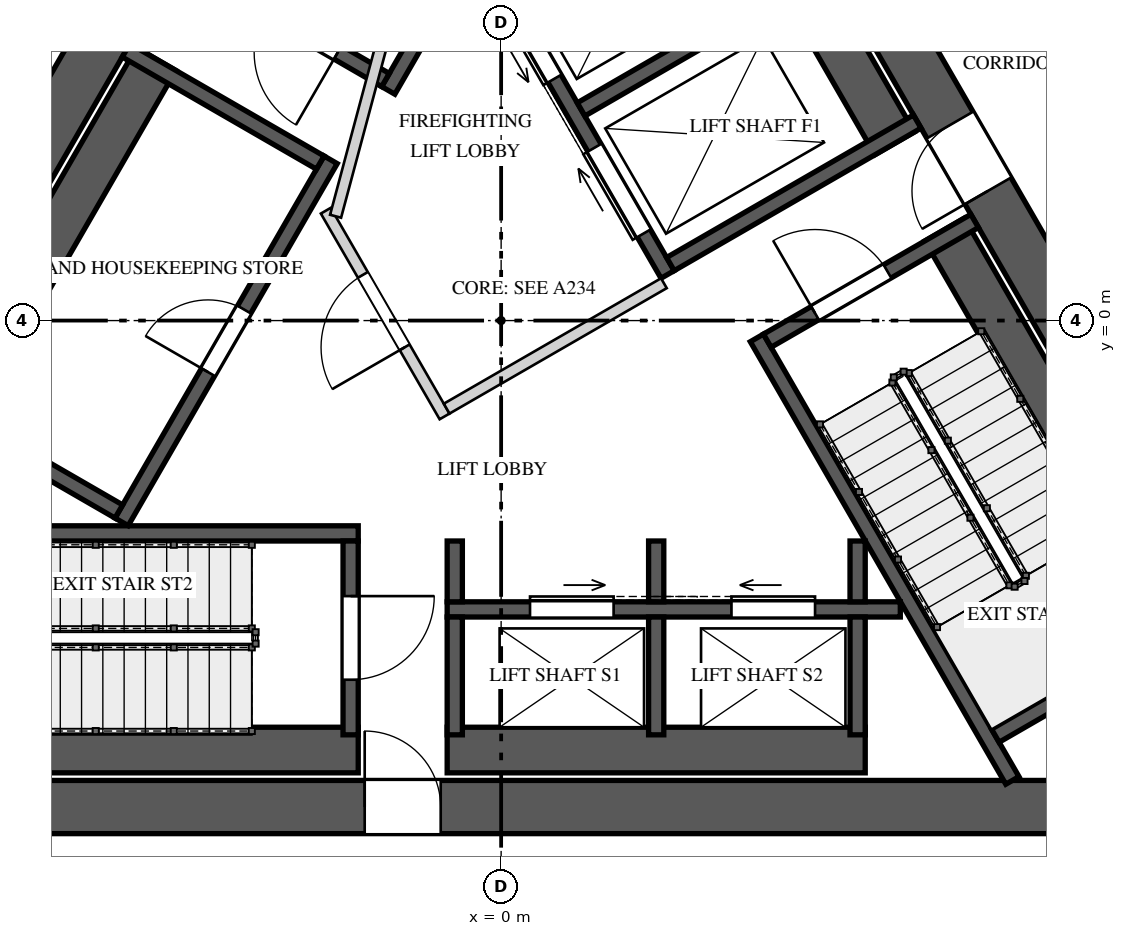
"""IFC4 building model, lengths in metres.
Left out: names, types, materials, properties, quantities, classifications, styles, units other than length and angle.
Written with IfcOpenShell. Run it as: python <this file> out.ifc"""

import sys

from ifc_helpers import new_model, si_unit, direction, frame, frame_2d, origin, place, context, subcontext, project, spatial, rectangle, extrude, element, fill, save


model = new_model("IFC4")
c1 = context("Model", 3, precision=1e-05, world=origin(), true_north=direction((0.0, 1.0)))
c2 = subcontext(c1, "Body", "Model", "MODEL_VIEW")
j1 = project(units=[si_unit("LENGTHUNIT", "METRE"), si_unit("PLANEANGLEUNIT", "RADIAN")], contexts=[c1])
p1 = place(None, origin())
s1 = spatial("IfcSite", under=j1, at=p1, CompositionType="ELEMENT")
p2 = place(p1, origin())
s2 = spatial("IfcBuilding", under=s1, at=p2, CompositionType="ELEMENT")
p3 = place(p2, frame((0.0, 0.0, 245.2)))
s3 = spatial("IfcBuildingStorey", under=s2, at=p3, CompositionType="ELEMENT", Elevation=245.2)
p4 = place(p3, frame((-1.241, 10.65, 0.0), z_axis=(0.0, 0.0, 1.0), x_axis=(-0.500003331888, -0.866023480109, 0.0)))
e1 = element("IfcWall", 1, at=p4, inside=s3, PredefinedType="SHEAR", context=c2, shape_type="SweptSolid", body=[
    extrude(rectangle(XDim=17.205, YDim=0.7, at=frame_2d((8.603, 0.0))), origin(), (0.0, 0.0, 1.0), 4.0),
])
p5 = place(p4, frame((6.808, 0.0, 0.0)))
e2 = element("IfcOpeningElement", 2, at=p5, cuts=e1, PredefinedType="OPENING", context=c2, shape_type="SweptSolid", body=[
    extrude(rectangle(XDim=1.0, YDim=2.4, at=frame_2d((0.5, 1.2))), frame((0.0, 0.36, 0.0), z_axis=(0.0, -1.0, 0.0), x_axis=(1.0, 0.0, 0.0)), (0.0, 0.0, 1.0), 0.72),
])
p6 = place(p4, frame((14.922, 0.0, 0.0)))
e3 = element("IfcOpeningElement", 3, at=p6, cuts=e1, PredefinedType="OPENING", context=c2, shape_type="SweptSolid", body=[
    extrude(rectangle(XDim=0.8, YDim=2.1, at=frame_2d((0.4, 1.05))), frame((0.0, 0.36, 0.0), z_axis=(0.0, -1.0, 0.0), x_axis=(1.0, 0.0, 0.0)), (0.0, 0.0, 1.0), 0.72),
])
p7 = place(p3, frame((-8.603, -6.4, 0.0), z_axis=(0.0, 0.0, 1.0), x_axis=(1.0, 0.0, 0.0)))
e4 = element("IfcWall", 4, at=p7, inside=s3, PredefinedType="SHEAR", context=c2, shape_type="SweptSolid", body=[
    extrude(rectangle(XDim=17.205, YDim=0.7, at=frame_2d((8.603, 0.0))), origin(), (0.0, 0.0, 1.0), 4.0),
])
p8 = place(p7, frame((6.808, 0.0, 0.0)))
e5 = element("IfcOpeningElement", 5, at=p8, cuts=e4, PredefinedType="OPENING", context=c2, shape_type="SweptSolid", body=[
    extrude(rectangle(XDim=1.0, YDim=2.4, at=frame_2d((0.5, 1.2))), frame((0.0, 0.36, 0.0), z_axis=(0.0, -1.0, 0.0), x_axis=(1.0, 0.0, 0.0)), (0.0, 0.0, 1.0), 0.72),
])
p9 = place(p3, frame((9.844, -4.25, 0.0), z_axis=(0.0, 0.0, 1.0), x_axis=(-0.500003331888, 0.866023480109, 0.0)))
e6 = element("IfcWall", 6, at=p9, inside=s3, PredefinedType="SHEAR", context=c2, shape_type="SweptSolid", body=[
    extrude(rectangle(XDim=17.205, YDim=0.7, at=frame_2d((8.603, 0.0))), origin(), (0.0, 0.0, 1.0), 4.0),
])
p10 = place(p9, frame((6.877, 0.0, 0.0)))
e7 = element("IfcOpeningElement", 7, at=p10, cuts=e6, PredefinedType="OPENING", context=c2, shape_type="SweptSolid", body=[
    extrude(rectangle(XDim=1.0, YDim=2.4, at=frame_2d((0.5, 1.2))), frame((0.0, 0.36, 0.0), z_axis=(0.0, -1.0, 0.0), x_axis=(1.0, 0.0, 0.0)), (0.0, 0.0, 1.0), 0.72),
])
p11 = place(p3, frame((1.876, 8.85, 0.0), z_axis=(0.0, 0.0, 1.0), x_axis=(-0.499998042495, -0.866026533947, 0.0)))
e8 = element("IfcWall", 8, at=p11, inside=s3, PredefinedType="SOLIDWALL", context=c2, shape_type="SweptSolid", body=[
    extrude(rectangle(XDim=6.723, YDim=0.2, at=frame_2d((3.361, 0.0))), origin(), (0.0, 0.0, 1.0), 3.65),
])
p12 = place(p3, frame((-1.521, 3.165, 0.0), z_axis=(0.0, 0.0, 1.0), x_axis=(-0.866035871367, 0.499981869177, 0.0)))
e9 = element("IfcWall", 9, at=p12, inside=s3, PredefinedType="SOLIDWALL", context=c2, shape_type="SweptSolid", body=[
    extrude(rectangle(XDim=3.15, YDim=0.2, at=frame_2d((1.575, 0.0))), origin(), (0.0, 0.0, 1.0), 3.65),
])
p13 = place(p12, frame((0.725, 0.0, 0.0)))
e10 = element("IfcOpeningElement", 10, at=p13, cuts=e9, PredefinedType="OPENING", context=c2, shape_type="SweptSolid", body=[
    extrude(rectangle(XDim=1.1, YDim=2.4, at=frame_2d((0.55, 1.2))), frame((0.0, 0.11, 0.0), z_axis=(0.0, -1.0, 0.0), x_axis=(1.0, 0.0, 0.0)), (0.0, 0.0, 1.0), 0.22),
])
p14 = place(p3, frame((-8.08, -5.65, 0.0), z_axis=(0.0, 0.0, 1.0), x_axis=(1.0, 0.0, 0.0)))
e11 = element("IfcWall", 11, at=p14, inside=s3, PredefinedType="SOLIDWALL", context=c2, shape_type="SweptSolid", body=[
    extrude(rectangle(XDim=6.2, YDim=0.6, at=frame_2d((3.1, 0.0))), origin(), (0.0, 0.0, 1.0), 3.65),
])
p15 = place(p3, frame((-8.603, -2.8, 0.0), z_axis=(0.0, 0.0, 1.0), x_axis=(1.0, 0.0, 0.0)))
e12 = element("IfcWall", 12, at=p15, inside=s3, PredefinedType="SOLIDWALL", context=c2, shape_type="SweptSolid", body=[
    extrude(rectangle(XDim=6.723, YDim=0.2, at=frame_2d((3.361, 0.0))), origin(), (0.0, 0.0, 1.0), 3.65),
])
p16 = place(p3, frame((-1.98, -2.9, 0.0), z_axis=(0.0, 0.0, 1.0), x_axis=(0.0, -1.0, 0.0)))
e13 = element("IfcWall", 13, at=p16, inside=s3, PredefinedType="SOLIDWALL", context=c2, shape_type="SweptSolid", body=[
    extrude(rectangle(XDim=2.55, YDim=0.2, at=frame_2d((1.275, 0.0))), origin(), (0.0, 0.0, 1.0), 3.65),
])
p17 = place(p16, frame((0.725, 0.0, 0.0)))
e14 = element("IfcOpeningElement", 14, at=p17, cuts=e13, PredefinedType="OPENING", context=c2, shape_type="SweptSolid", body=[
    extrude(rectangle(XDim=1.1, YDim=2.4, at=frame_2d((0.55, 1.2))), frame((0.0, 0.11, 0.0), z_axis=(0.0, -1.0, 0.0), x_axis=(1.0, 0.0, 0.0)), (0.0, 0.0, 1.0), 0.22),
])
p18 = place(p3, frame((8.933, -4.172, 0.0), z_axis=(0.0, 0.0, 1.0), x_axis=(-0.500026960575, 0.86600983753, 0.0)))
e15 = element("IfcWall", 15, at=p18, inside=s3, PredefinedType="SOLIDWALL", context=c2, shape_type="SweptSolid", body=[
    extrude(rectangle(XDim=6.2, YDim=0.6, at=frame_2d((3.1, 0.0))), origin(), (0.0, 0.0, 1.0), 3.65),
])
p19 = place(p3, frame((6.726, -6.05, 0.0), z_axis=(0.0, 0.0, 1.0), x_axis=(-0.499970804718, 0.866042259032, 0.0)))
e16 = element("IfcWall", 16, at=p19, inside=s3, PredefinedType="SOLIDWALL", context=c2, shape_type="SweptSolid", body=[
    extrude(rectangle(XDim=6.723, YDim=0.2, at=frame_2d((3.361, 0.0))), origin(), (0.0, 0.0, 1.0), 3.65),
])
p20 = place(p3, frame((6.501, -5.461, 0.0), z_axis=(0.0, 0.0, 1.0), x_axis=(0.866035871367, 0.499981869177, 0.0)))
e17 = element("IfcWall", 17, at=p20, inside=s3, PredefinedType="SOLIDWALL", context=c2, shape_type="SweptSolid", body=[
    extrude(rectangle(XDim=3.15, YDim=0.2, at=frame_2d((1.575, 0.0))), origin(), (0.0, 0.0, 1.0), 3.65),
])
p21 = place(p3, frame((3.501, -0.265, 0.0), z_axis=(0.0, 0.0, 1.0), x_axis=(0.866035871367, 0.499981869177, 0.0)))
e18 = element("IfcWall", 18, at=p21, inside=s3, PredefinedType="SOLIDWALL", context=c2, shape_type="SweptSolid", body=[
    extrude(rectangle(XDim=3.15, YDim=0.2, at=frame_2d((1.575, 0.0))), origin(), (0.0, 0.0, 1.0), 3.65),
])
p22 = place(p21, frame((0.725, 0.0, 0.0)))
e19 = element("IfcOpeningElement", 19, at=p22, cuts=e18, PredefinedType="OPENING", context=c2, shape_type="SweptSolid", body=[
    extrude(rectangle(XDim=1.1, YDim=2.4, at=frame_2d((0.55, 1.2))), frame((0.0, 0.11, 0.0), z_axis=(0.0, -1.0, 0.0), x_axis=(1.0, 0.0, 0.0)), (0.0, 0.0, 1.0), 0.22),
])
p23 = place(p3, frame((-4.993, -2.648, 0.0), z_axis=(0.0, 0.0, 1.0), x_axis=(0.499996545922, 0.866027397988, 0.0)))
e20 = element("IfcWall", 20, at=p23, inside=s3, PredefinedType="SOLIDWALL", context=c2, shape_type="SweptSolid", body=[
    extrude(rectangle(XDim=5.5, YDim=0.2, at=frame_2d((2.75, 0.0))), origin(), (0.0, 0.0, 1.0), 3.65),
])
p24 = place(p23, frame((2.275, 0.0, 0.0)))
e21 = element("IfcOpeningElement", 21, at=p24, cuts=e20, PredefinedType="OPENING", context=c2, shape_type="SweptSolid", body=[
    extrude(rectangle(XDim=0.95, YDim=2.4, at=frame_2d((0.475, 1.2))), frame((0.0, 0.11, 0.0), z_axis=(0.0, -1.0, 0.0), x_axis=(1.0, 0.0, 0.0)), (0.0, 0.0, 1.0), 0.22),
])
p25 = place(p3, frame((-4.538, 3.44, 0.0), z_axis=(0.0, 0.0, 1.0), x_axis=(-0.499996545922, -0.866027397988, 0.0)))
e22 = element("IfcWall", 22, at=p25, inside=s3, PredefinedType="SOLIDWALL", context=c2, shape_type="SweptSolid", body=[
    extrude(rectangle(XDim=5.5, YDim=0.6, at=frame_2d((2.75, 0.0))), origin(), (0.0, 0.0, 1.0), 3.65),
])
for number, where, z_axis, x_axis in (
    (23, (-2.38, 2.078, 0.0), (0.0, 0.0, 1.0), (-0.866, 0.5, 0.0)),
    (24, (-5.03, -2.512, 0.0), (0.0, 0.0, 1.0), (-0.866, 0.5, 0.0)),
):
    element("IfcWall", number, at=place(p3, frame(where, z_axis=z_axis, x_axis=x_axis)), inside=s3, PredefinedType="SOLIDWALL", context=c2, shape_type="SweptSolid", body=[
        extrude(rectangle(XDim=2.95, YDim=0.2, at=frame_2d((1.475, 0.0))), origin(), (0.0, 0.0, 1.0), 3.65),
    ])
p26 = place(p3, frame((-0.71, -3.8, 0.0), z_axis=(0.0, 0.0, 1.0), x_axis=(1.0, 0.0, 0.0)))
e25 = element("IfcWall", 25, at=p26, inside=s3, PredefinedType="SOLIDWALL", context=c2, shape_type="SweptSolid", body=[
    extrude(rectangle(XDim=5.961, YDim=0.2, at=frame_2d((2.981, 0.0))), origin(), (0.0, 0.0, 1.0), 3.65),
])
p27 = place(p26, frame((1.09, 0.0, 0.0)))
e26 = element("IfcOpeningElement", 26, at=p27, cuts=e25, PredefinedType="OPENING", context=c2, shape_type="SweptSolid", body=[
    extrude(rectangle(XDim=1.1, YDim=2.1, at=frame_2d((0.55, 1.05))), frame((0.0, 0.11, 0.0), z_axis=(0.0, -1.0, 0.0), x_axis=(1.0, 0.0, 0.0)), (0.0, 0.0, 1.0), 0.22),
])
p28 = place(p26, frame((3.74, 0.0, 0.0)))
e27 = element("IfcOpeningElement", 27, at=p28, cuts=e25, PredefinedType="OPENING", context=c2, shape_type="SweptSolid", body=[
    extrude(rectangle(XDim=1.1, YDim=2.1, at=frame_2d((0.55, 1.05))), frame((0.0, 0.11, 0.0), z_axis=(0.0, -1.0, 0.0), x_axis=(1.0, 0.0, 0.0)), (0.0, 0.0, 1.0), 0.22),
])
p29 = place(p3, frame((-0.71, -5.65, 0.0), z_axis=(0.0, 0.0, 1.0), x_axis=(1.0, 0.0, 0.0)))
e28 = element("IfcWall", 28, at=p29, inside=s3, PredefinedType="SOLIDWALL", context=c2, shape_type="SweptSolid", body=[
    extrude(rectangle(XDim=5.5, YDim=0.6, at=frame_2d((2.75, 0.0))), origin(), (0.0, 0.0, 1.0), 3.65),
])
p30 = place(p3, frame((-0.61, -3.9, 0.0), z_axis=(0.0, 0.0, 1.0), x_axis=(0.0, -1.0, 0.0)))
e29 = element("IfcWall", 29, at=p30, inside=s3, PredefinedType="SOLIDWALL", context=c2, shape_type="SweptSolid", body=[
    extrude(rectangle(XDim=1.55, YDim=0.2, at=frame_2d((0.775, 0.0))), origin(), (0.0, 0.0, 1.0), 3.65),
])
p31 = place(p3, frame((-0.61, -2.9, 0.0), z_axis=(0.0, 0.0, 1.0), x_axis=(0.0, -1.0, 0.0)))
e30 = element("IfcWall", 30, at=p31, inside=s3, PredefinedType="SOLIDWALL", context=c2, shape_type="SweptSolid", body=[
    extrude(rectangle(XDim=0.8, YDim=0.2, at=frame_2d((0.4, 0.0))), origin(), (0.0, 0.0, 1.0), 3.65),
])
p32 = place(p3, frame((2.04, -3.9, 0.0), z_axis=(0.0, 0.0, 1.0), x_axis=(0.0, -1.0, 0.0)))
e31 = element("IfcWall", 31, at=p32, inside=s3, PredefinedType="SOLIDWALL", context=c2, shape_type="SweptSolid", body=[
    extrude(rectangle(XDim=1.55, YDim=0.2, at=frame_2d((0.775, 0.0))), origin(), (0.0, 0.0, 1.0), 3.65),
])
p33 = place(p3, frame((2.04, -2.9, 0.0), z_axis=(0.0, 0.0, 1.0), x_axis=(0.0, -1.0, 0.0)))
e32 = element("IfcWall", 32, at=p33, inside=s3, PredefinedType="SOLIDWALL", context=c2, shape_type="SweptSolid", body=[
    extrude(rectangle(XDim=0.8, YDim=0.2, at=frame_2d((0.4, 0.0))), origin(), (0.0, 0.0, 1.0), 3.65),
])
p34 = place(p3, frame((4.69, -3.9, 0.0), z_axis=(0.0, 0.0, 1.0), x_axis=(0.0, -1.0, 0.0)))
e33 = element("IfcWall", 33, at=p34, inside=s3, PredefinedType="SOLIDWALL", context=c2, shape_type="SweptSolid", body=[
    extrude(rectangle(XDim=1.55, YDim=0.2, at=frame_2d((0.775, 0.0))), origin(), (0.0, 0.0, 1.0), 3.65),
])
p35 = place(p3, frame((4.69, -2.9, 0.0), z_axis=(0.0, 0.0, 1.0), x_axis=(0.0, -1.0, 0.0)))
e34 = element("IfcWall", 34, at=p35, inside=s3, PredefinedType="SOLIDWALL", context=c2, shape_type="SweptSolid", body=[
    extrude(rectangle(XDim=0.8, YDim=0.2, at=frame_2d((0.4, 0.0))), origin(), (0.0, 0.0, 1.0), 3.65),
])
p36 = place(p3, frame((2.19, 0.606, 0.0), z_axis=(0.0, 0.0, 1.0), x_axis=(-0.500002801628, 0.866023786258, 0.0)))
e35 = element("IfcWall", 35, at=p36, inside=s3, PredefinedType="SOLIDWALL", context=c2, shape_type="SweptSolid", body=[
    extrude(rectangle(XDim=4.9, YDim=0.2, at=frame_2d((2.45, 0.0))), origin(), (0.0, 0.0, 1.0), 3.65),
])
p37 = place(p36, frame((0.625, 0.0, 0.0)))
e36 = element("IfcOpeningElement", 36, at=p37, cuts=e35, PredefinedType="OPENING", context=c2, shape_type="SweptSolid", body=[
    extrude(rectangle(XDim=1.3, YDim=2.1, at=frame_2d((0.65, 1.05))), frame((0.0, 0.11, 0.0), z_axis=(0.0, -1.0, 0.0), x_axis=(1.0, 0.0, 0.0)), (0.0, 0.0, 1.0), 0.22),
])
p38 = place(p36, frame((2.975, 0.0, 0.0)))
e37 = element("IfcOpeningElement", 37, at=p38, cuts=e35, PredefinedType="OPENING", context=c2, shape_type="SweptSolid", body=[
    extrude(rectangle(XDim=1.3, YDim=2.1, at=frame_2d((0.65, 1.05))), frame((0.0, 0.11, 0.0), z_axis=(0.0, -1.0, 0.0), x_axis=(1.0, 0.0, 0.0)), (0.0, 0.0, 1.0), 0.22),
])
p39 = place(p3, frame((5.178, 2.331, 0.0), z_axis=(0.0, 0.0, 1.0), x_axis=(-0.49998122708, 0.866036242063, 0.0)))
e38 = element("IfcWall", 38, at=p39, inside=s3, PredefinedType="SOLIDWALL", context=c2, shape_type="SweptSolid", body=[
    extrude(rectangle(XDim=4.9, YDim=0.6, at=frame_2d((2.45, 0.0))), origin(), (0.0, 0.0, 1.0), 3.65),
])
p40 = place(p3, frame((2.227, 0.743, 0.0), z_axis=(0.0, 0.0, 1.0), x_axis=(0.866022959057, 0.500004234368, 0.0)))
e39 = element("IfcWall", 39, at=p40, inside=s3, PredefinedType="SOLIDWALL", context=c2, shape_type="SweptSolid", body=[
    extrude(rectangle(XDim=3.75, YDim=0.2, at=frame_2d((1.875, 0.0))), origin(), (0.0, 0.0, 1.0), 3.65),
])
p41 = place(p3, frame((1.052, 2.778, 0.0), z_axis=(0.0, 0.0, 1.0), x_axis=(0.866039234136, 0.499976044363, 0.0)))
e40 = element("IfcWall", 40, at=p41, inside=s3, PredefinedType="SOLIDWALL", context=c2, shape_type="SweptSolid", body=[
    extrude(rectangle(XDim=3.75, YDim=0.2, at=frame_2d((1.875, 0.0))), origin(), (0.0, 0.0, 1.0), 3.65),
])
p42 = place(p3, frame((-0.744, -1.261, 0.0), z_axis=(0.0, 0.0, 1.0), x_axis=(-0.500004234368, 0.866022959057, 0.0)))
e41 = element("IfcWall", 41, at=p42, inside=s3, PredefinedType="PARTITIONING", context=c2, shape_type="SweptSolid", body=[
    extrude(rectangle(XDim=3.125, YDim=0.15, at=frame_2d((1.562, 0.0))), origin(), (0.0, 0.0, 1.0), 3.65),
])
p43 = place(p42, frame((1.05, 0.0, 0.0)))
e42 = element("IfcOpeningElement", 42, at=p43, cuts=e41, PredefinedType="OPENING", context=c2, shape_type="SweptSolid", body=[
    extrude(rectangle(XDim=1.1, YDim=2.4, at=frame_2d((0.55, 1.2))), frame((0.0, 0.085, 0.0), z_axis=(0.0, -1.0, 0.0), x_axis=(1.0, 0.0, 0.0)), (0.0, 0.0, 1.0), 0.17),
])
p44 = place(p3, frame((-0.717, -1.159, 0.0), z_axis=(0.0, 0.0, 1.0), x_axis=(0.866008176907, 0.50002983664, 0.0)))
e43 = element("IfcWall", 43, at=p44, inside=s3, PredefinedType="PARTITIONING", context=c2, shape_type="SweptSolid", body=[
    extrude(rectangle(XDim=3.3, YDim=0.15, at=frame_2d((1.65, 0.0))), origin(), (0.0, 0.0, 1.0), 3.65),
])
p45 = place(p3, frame((-2.178, 1.372, 0.0), z_axis=(0.0, 0.0, 1.0), x_axis=(0.258808958833, 0.96592852884, 0.0)))
e44 = element("IfcWall", 44, at=p45, inside=s3, PredefinedType="PARTITIONING", context=c2, shape_type="SweptSolid", body=[
    extrude(rectangle(XDim=2.903, YDim=0.15, at=frame_2d((1.451, 0.0))), origin(), (0.0, 0.0, 1.0), 3.65),
])
p46 = place(p13, origin())
e45 = element("IfcDoor", 45, at=p46, inside=s3, OperationType="SINGLE_SWING_RIGHT", PredefinedType="DOOR", context=c2, shape_type="SweptSolid", body=[
    extrude(rectangle(XDim=1.1, YDim=2.4, at=frame_2d((0.55, 1.2))), frame((0.0, 0.025, 0.0), z_axis=(0.0, -1.0, 0.0), x_axis=(1.0, 0.0, 0.0)), (0.0, 0.0, 1.0), 0.05),
])
fill(e10, e45)
p47 = place(p17, origin())
e46 = element("IfcDoor", 46, at=p47, inside=s3, OperationType="SINGLE_SWING_LEFT", PredefinedType="DOOR", context=c2, shape_type="SweptSolid", body=[
    extrude(rectangle(XDim=1.1, YDim=2.4, at=frame_2d((0.55, 1.2))), frame((0.0, 0.025, 0.0), z_axis=(0.0, -1.0, 0.0), x_axis=(1.0, 0.0, 0.0)), (0.0, 0.0, 1.0), 0.05),
])
fill(e14, e46)
p48 = place(p22, origin())
e47 = element("IfcDoor", 47, at=p48, inside=s3, OperationType="SINGLE_SWING_RIGHT", PredefinedType="DOOR", context=c2, shape_type="SweptSolid", body=[
    extrude(rectangle(XDim=1.1, YDim=2.4, at=frame_2d((0.55, 1.2))), frame((0.0, 0.025, 0.0), z_axis=(0.0, -1.0, 0.0), x_axis=(1.0, 0.0, 0.0)), (0.0, 0.0, 1.0), 0.05),
])
fill(e19, e47)
p49 = place(p24, origin())
e48 = element("IfcDoor", 48, at=p49, inside=s3, OperationType="SINGLE_SWING_LEFT", PredefinedType="DOOR", context=c2, shape_type="SweptSolid", body=[
    extrude(rectangle(XDim=0.95, YDim=2.4, at=frame_2d((0.475, 1.2))), frame((0.0, 0.025, 0.0), z_axis=(0.0, -1.0, 0.0), x_axis=(1.0, 0.0, 0.0)), (0.0, 0.0, 1.0), 0.05),
])
fill(e21, e48)
p50 = place(p27, origin())
e49 = element("IfcDoor", 49, at=p50, inside=s3, OperationType="SLIDING_TO_RIGHT", PredefinedType="DOOR", context=c2, shape_type="SweptSolid", body=[
    extrude(rectangle(XDim=1.1, YDim=2.1, at=frame_2d((0.55, 1.05))), frame((0.0, 0.025, 0.0), z_axis=(0.0, -1.0, 0.0), x_axis=(1.0, 0.0, 0.0)), (0.0, 0.0, 1.0), 0.05),
])
fill(e26, e49)
p51 = place(p28, origin())
e50 = element("IfcDoor", 50, at=p51, inside=s3, OperationType="SLIDING_TO_LEFT", PredefinedType="DOOR", context=c2, shape_type="SweptSolid", body=[
    extrude(rectangle(XDim=1.1, YDim=2.1, at=frame_2d((0.55, 1.05))), frame((0.0, 0.025, 0.0), z_axis=(0.0, -1.0, 0.0), x_axis=(1.0, 0.0, 0.0)), (0.0, 0.0, 1.0), 0.05),
])
fill(e27, e50)
p52 = place(p37, origin())
e51 = element("IfcDoor", 51, at=p52, inside=s3, OperationType="SLIDING_TO_RIGHT", PredefinedType="DOOR", context=c2, shape_type="SweptSolid", body=[
    extrude(rectangle(XDim=1.3, YDim=2.1, at=frame_2d((0.65, 1.05))), frame((0.0, 0.025, 0.0), z_axis=(0.0, -1.0, 0.0), x_axis=(1.0, 0.0, 0.0)), (0.0, 0.0, 1.0), 0.05),
])
fill(e36, e51)
p53 = place(p38, origin())
e52 = element("IfcDoor", 52, at=p53, inside=s3, OperationType="SLIDING_TO_LEFT", PredefinedType="DOOR", context=c2, shape_type="SweptSolid", body=[
    extrude(rectangle(XDim=1.3, YDim=2.1, at=frame_2d((0.65, 1.05))), frame((0.0, 0.025, 0.0), z_axis=(0.0, -1.0, 0.0), x_axis=(1.0, 0.0, 0.0)), (0.0, 0.0, 1.0), 0.05),
])
fill(e37, e52)
p54 = place(p43, origin())
e53 = element("IfcDoor", 53, at=p54, inside=s3, OperationType="SINGLE_SWING_RIGHT", PredefinedType="DOOR", context=c2, shape_type="SweptSolid", body=[
    extrude(rectangle(XDim=1.1, YDim=2.4, at=frame_2d((0.55, 1.2))), frame((0.0, 0.025, 0.0), z_axis=(0.0, -1.0, 0.0), x_axis=(1.0, 0.0, 0.0)), (0.0, 0.0, 1.0), 0.05),
])
fill(e42, e53)
p55 = place(p8, origin())
e54 = element("IfcDoor", 54, at=p55, inside=s3, OperationType="SINGLE_SWING_RIGHT", PredefinedType="DOOR", context=c2, shape_type="SweptSolid", body=[
    extrude(rectangle(XDim=1.0, YDim=2.4, at=frame_2d((0.5, 1.2))), frame((0.0, 0.025, 0.0), z_axis=(0.0, -1.0, 0.0), x_axis=(1.0, 0.0, 0.0)), (0.0, 0.0, 1.0), 0.05),
])
fill(e5, e54)
p56 = place(p10, origin())
e55 = element("IfcDoor", 55, at=p56, inside=s3, OperationType="SINGLE_SWING_LEFT", PredefinedType="DOOR", context=c2, shape_type="SweptSolid", body=[
    extrude(rectangle(XDim=1.0, YDim=2.4, at=frame_2d((0.5, 1.2))), frame((0.0, 0.025, 0.0), z_axis=(0.0, -1.0, 0.0), x_axis=(1.0, 0.0, 0.0)), (0.0, 0.0, 1.0), 0.05),
])
fill(e7, e55)
save(model, sys.argv[1])
